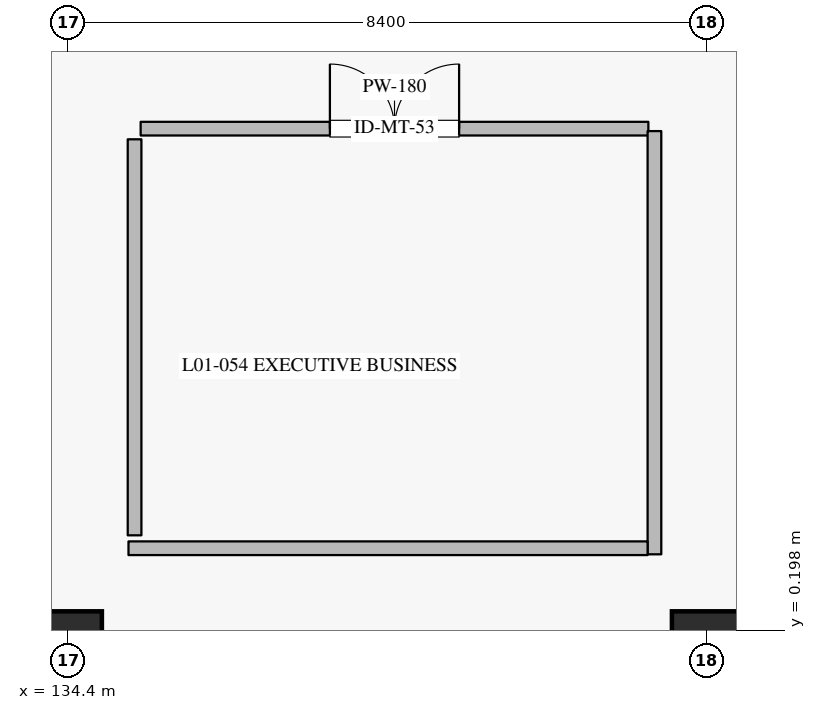
"""IFC4 building model, lengths in metres.
Left out: names, types, materials, properties, quantities, classifications, styles, units other than length and angle.
Written with IfcOpenShell. Run it as: python <this file> out.ifc"""

import sys

from ifc_helpers import new_model, si_unit, direction, frame, frame_2d, origin, origin_2d, place, context, subcontext, project, spatial, rectangle, circle, extrude, element, fill, save


model = new_model("IFC4")
c1 = context("Model", 3, precision=1e-05, world=origin(), true_north=direction((0.0, 1.0)))
c2 = subcontext(c1, "Body", "Model", "MODEL_VIEW")
j1 = project(units=[si_unit("LENGTHUNIT", "METRE"), si_unit("PLANEANGLEUNIT", "RADIAN")], contexts=[c1])
p1 = place(None, origin())
s1 = spatial("IfcSite", under=j1, at=p1, CompositionType="ELEMENT")
p2 = place(p1, origin())
s2 = spatial("IfcBuilding", under=s1, at=p2, CompositionType="ELEMENT")
p3 = place(p2, frame((0.0, 0.0, 6.0)))
s3 = spatial("IfcBuildingStorey", under=s2, at=p3, CompositionType="ELEMENT", Elevation=6.0)
for number, where, z_axis, x_axis in (
    (1, (134.4, 0.0, 0.0), (0.0, 0.0, 1.0), (1.0, 0.0, 0.0)),
    (2, (142.8, 0.0, 0.0), (0.0, 0.0, 1.0), (1.0, 0.0, 0.0)),
):
    element("IfcColumn", number, at=place(p3, frame(where, z_axis=z_axis, x_axis=x_axis)), inside=s3, PredefinedType="COLUMN", context=c2, shape_type="SweptSolid", body=[
        extrude(circle(Radius=0.45, at=origin_2d()), origin(), (0.0, 0.0, 1.0), 5.4),
    ])
p4 = place(p3, frame((135.36, 6.8, 0.0), z_axis=(0.0, 0.0, 1.0), x_axis=(1.0, 0.0, 0.0)))
e3 = element("IfcWall", 3, at=p4, inside=s3, PredefinedType="PARTITIONING", context=c2, shape_type="SweptSolid", body=[
    extrude(rectangle(XDim=6.68, YDim=0.18, at=frame_2d((3.34, 0.0))), origin(), (0.0, 0.0, 1.0), 5.045),
])
p5 = place(p4, frame((2.49, 0.0, 0.0)))
e4 = element("IfcOpeningElement", 4, at=p5, cuts=e3, PredefinedType="OPENING", context=c2, shape_type="SweptSolid", body=[
    extrude(rectangle(XDim=1.7, YDim=2.3, at=frame_2d((0.85, 1.15))), frame((0.0, 0.1, 0.0), z_axis=(0.0, -1.0, 0.0), x_axis=(1.0, 0.0, 0.0)), (0.0, 0.0, 1.0), 0.2),
])
p6 = place(p3, frame((135.28, 1.45, 0.0), z_axis=(0.0, 0.0, 1.0), x_axis=(0.0, 1.0, 0.0)))
e5 = element("IfcWall", 5, at=p6, inside=s3, PredefinedType="PARTITIONING", context=c2, shape_type="SweptSolid", body=[
    extrude(rectangle(XDim=5.21, YDim=0.18, at=frame_2d((2.605, 0.0))), origin(), (0.0, 0.0, 1.0), 5.045),
])
p7 = place(p3, frame((142.12, 1.2, 0.0), z_axis=(0.0, 0.0, 1.0), x_axis=(0.0, 1.0, 0.0)))
e6 = element("IfcWall", 6, at=p7, inside=s3, PredefinedType="PARTITIONING", context=c2, shape_type="SweptSolid", body=[
    extrude(rectangle(XDim=5.568, YDim=0.18, at=frame_2d((2.784, 0.0))), origin(), (0.0, 0.0, 1.0), 5.045),
])
p8 = place(p3, frame((135.2, 1.28, 0.0), z_axis=(0.0, 0.0, 1.0), x_axis=(1.0, 0.0, 0.0)))
e7 = element("IfcWall", 7, at=p8, inside=s3, PredefinedType="PARTITIONING", context=c2, shape_type="SweptSolid", body=[
    extrude(rectangle(XDim=6.83, YDim=0.18, at=frame_2d((3.415, 0.0))), origin(), (0.0, 0.0, 1.0), 5.045),
])
p9 = place(p5, origin())
e8 = element("IfcDoor", 8, at=p9, inside=s3, OperationType="DOUBLE_DOOR_SINGLE_SWING", PredefinedType="DOOR", context=c2, shape_type="SweptSolid", body=[
    extrude(rectangle(XDim=1.7, YDim=2.3, at=frame_2d((0.85, 1.15))), frame((0.0, 0.025, 0.0), z_axis=(0.0, -1.0, 0.0), x_axis=(1.0, 0.0, 0.0)), (0.0, 0.0, 1.0), 0.05),
])
fill(e4, e8)
save(model, sys.argv[1])
